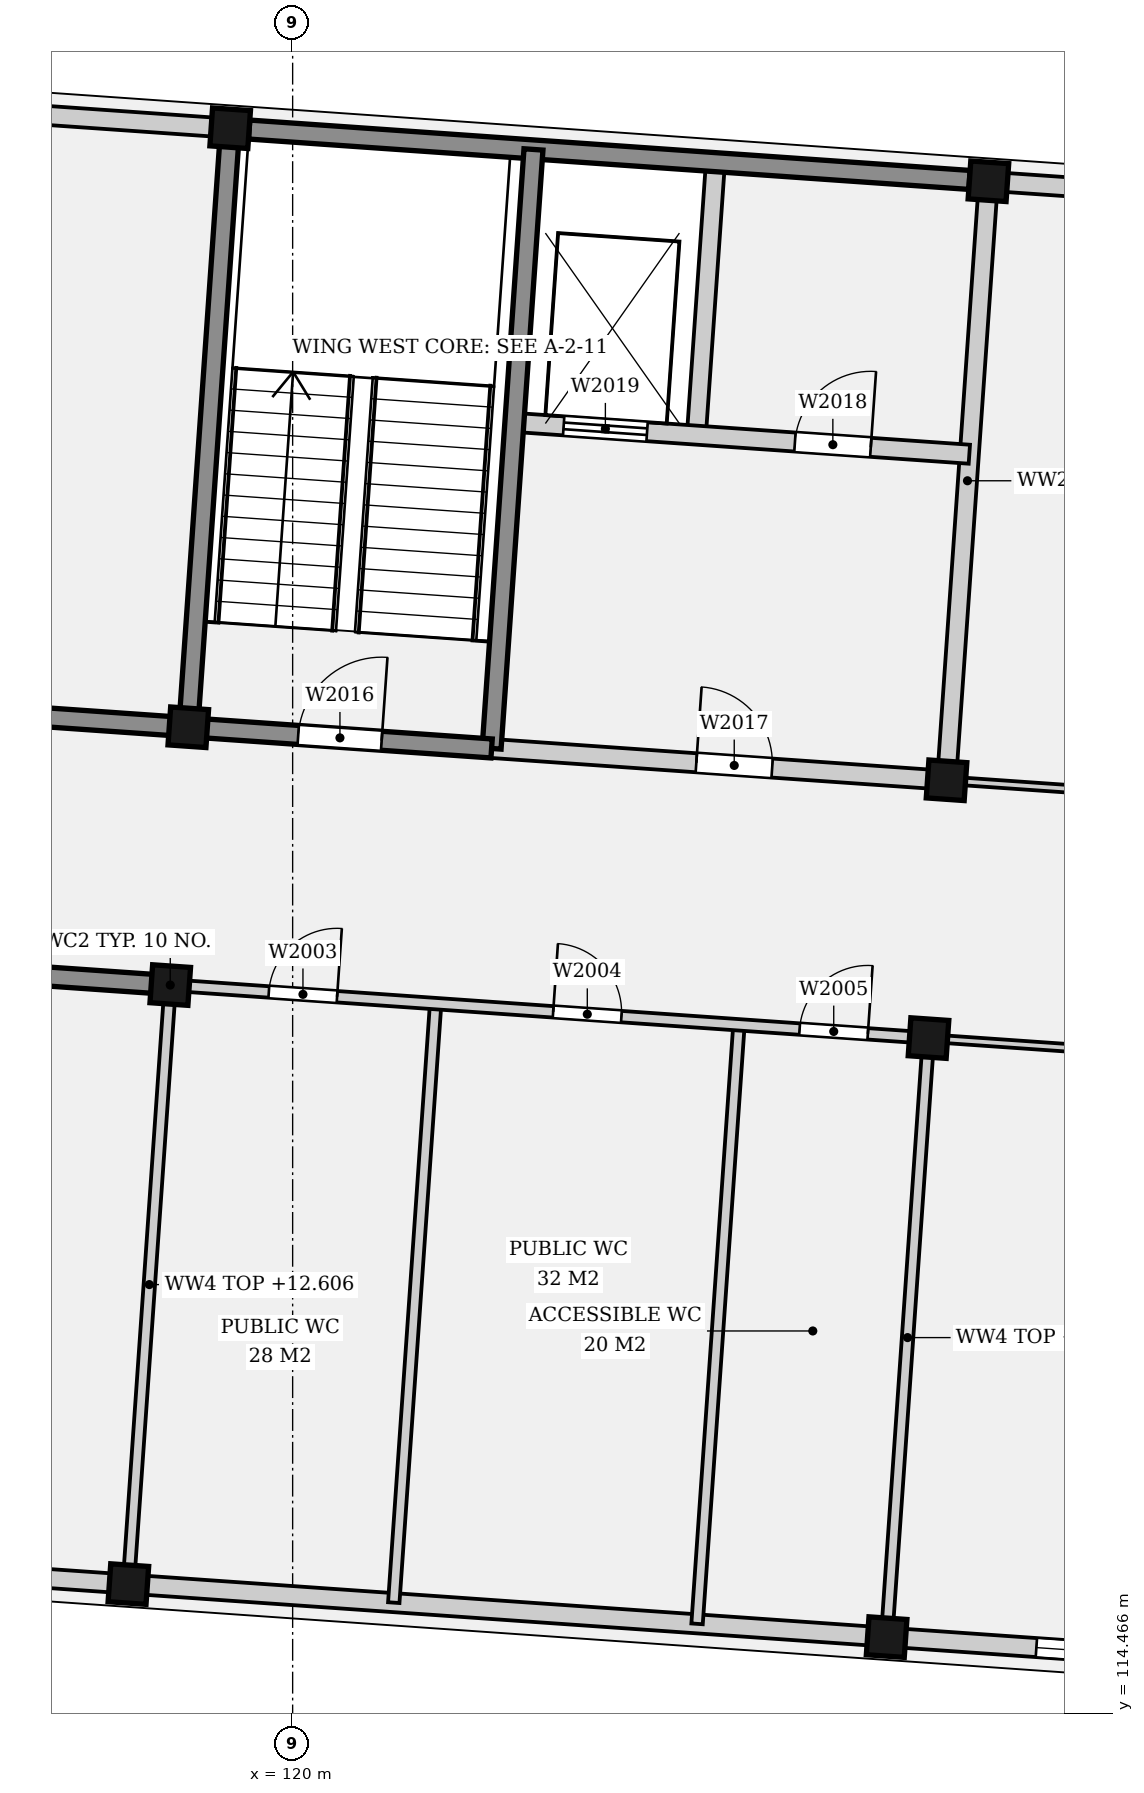
"""IFC4 building model, lengths in metres.
Left out: names, types, materials, properties, quantities, classifications, styles, units other than length and angle.
Written with IfcOpenShell. Run it as: python <this file> out.ifc"""

import sys

from ifc_helpers import new_model, si_unit, direction, frame, frame_2d, origin, origin_2d, place, context, subcontext, project, spatial, rectangle, extrude, element, fill, save


model = new_model("IFC4")
c1 = context("Model", 3, precision=1e-05, world=origin(), true_north=direction((0.0, 1.0)))
c2 = subcontext(c1, "Body", "Model", "MODEL_VIEW")
j1 = project(units=[si_unit("LENGTHUNIT", "METRE"), si_unit("PLANEANGLEUNIT", "RADIAN")], contexts=[c1])
p1 = place(None, origin())
s1 = spatial("IfcSite", under=j1, at=p1, CompositionType="ELEMENT")
p2 = place(p1, origin())
s2 = spatial("IfcBuilding", under=s1, at=p2, CompositionType="ELEMENT")
p3 = place(p2, frame((0.0, 0.0, 9.4)))
s3 = spatial("IfcBuildingStorey", under=s2, at=p3, CompositionType="ELEMENT", Elevation=9.4)
for number, where, z_axis, x_axis in (
    (1, (117.839, 116.167, 0.0), (0.0, 0.0, 1.0), (0.998, -0.07, 0.0)),
    (2, (118.39, 124.048, 0.0), (0.0, 0.0, 1.0), (0.998, -0.07, 0.0)),
    (3, (118.627, 127.44, 0.0), (0.0, 0.0, 1.0), (0.998, -0.07, 0.0)),
    (4, (119.178, 135.321, 0.0), (0.0, 0.0, 1.0), (0.998, -0.07, 0.0)),
    (5, (127.814, 115.47, 0.0), (0.0, 0.0, 1.0), (0.998, -0.07, 0.0)),
    (6, (128.365, 123.351, 0.0), (0.0, 0.0, 1.0), (0.998, -0.07, 0.0)),
    (7, (128.603, 126.742, 0.0), (0.0, 0.0, 1.0), (0.998, -0.07, 0.0)),
    (8, (129.154, 134.623, 0.0), (0.0, 0.0, 1.0), (0.998, -0.07, 0.0)),
):
    element("IfcColumn", number, at=place(p3, frame(where, z_axis=z_axis, x_axis=x_axis)), inside=s3, PredefinedType="COLUMN", context=c2, shape_type="SweptSolid", body=[
        extrude(rectangle(XDim=0.5, YDim=0.5, at=origin_2d()), origin(), (0.0, 0.0, 1.0), 4.4),
    ])
p4 = place(p3, frame((108.113, 116.848, 0.0), z_axis=(0.0, 0.0, 1.0), x_axis=(0.997564799463, -0.069745758817, 0.0)))
e9 = element("IfcWall", 9, at=p4, inside=s3, PredefinedType="SOLIDWALL", context=c2, shape_type="SweptSolid", body=[
    extrude(rectangle(XDim=9.5, YDim=0.25, at=frame_2d((4.75, 0.0))), origin(), (0.0, 0.0, 1.0), 3.206),
])
p5 = place(p3, frame((118.088, 116.15, 0.0), z_axis=(0.0, 0.0, 1.0), x_axis=(0.997562886035, -0.069773120941, 0.0)))
e10 = element("IfcWall", 10, at=p5, inside=s3, PredefinedType="SOLIDWALL", context=c2, shape_type="SweptSolid", body=[
    extrude(rectangle(XDim=9.5, YDim=0.25, at=frame_2d((4.75, 0.0))), origin(), (0.0, 0.0, 1.0), 3.57),
])
p6 = place(p3, frame((128.064, 115.452, 0.0), z_axis=(0.0, 0.0, 1.0), x_axis=(0.997564674448, -0.06974754686, 0.0)))
e11 = element("IfcWall", 11, at=p6, inside=s3, PredefinedType="SOLIDWALL", context=c2, shape_type="SweptSolid", body=[
    extrude(rectangle(XDim=9.5, YDim=0.25, at=frame_2d((4.75, 0.0))), origin(), (0.0, 0.0, 1.0), 3.57),
])
p7 = place(p6, frame((1.725, 0.0, 0.9)))
e12 = element("IfcOpeningElement", 12, at=p7, cuts=e11, PredefinedType="OPENING", context=c2, shape_type="SweptSolid", body=[
    extrude(rectangle(XDim=1.8, YDim=2.4, at=frame_2d((0.9, 1.2))), frame((0.0, 0.135, 0.0), z_axis=(0.0, -1.0, 0.0), x_axis=(1.0, 0.0, 0.0)), (0.0, 0.0, 1.0), 0.27),
])
p8 = place(p6, frame((5.975, 0.0, 0.9)))
e13 = element("IfcOpeningElement", 13, at=p8, cuts=e11, PredefinedType="OPENING", context=c2, shape_type="SweptSolid", body=[
    extrude(rectangle(XDim=1.8, YDim=2.4, at=frame_2d((0.9, 1.2))), frame((0.0, 0.135, 0.0), z_axis=(0.0, -1.0, 0.0), x_axis=(1.0, 0.0, 0.0)), (0.0, 0.0, 1.0), 0.27),
])
p9 = place(p3, frame((109.452, 136.001, 0.0), z_axis=(0.0, 0.0, 1.0), x_axis=(0.997562886035, -0.069773120941, 0.0)))
e14 = element("IfcWall", 14, at=p9, inside=s3, PredefinedType="SOLIDWALL", context=c2, shape_type="SweptSolid", body=[
    extrude(rectangle(XDim=9.5, YDim=0.25, at=frame_2d((4.75, 0.0))), origin(), (0.0, 0.0, 1.0), 3.206),
])
p10 = place(p3, frame((119.427, 135.303, 0.0), z_axis=(0.0, 0.0, 1.0), x_axis=(0.997564674448, -0.06974754686, 0.0)))
e15 = element("IfcWall", 15, at=p10, inside=s3, PredefinedType="SOLIDWALL", context=c2, shape_type="SweptSolid", body=[
    extrude(rectangle(XDim=9.5, YDim=0.25, at=frame_2d((4.75, 0.0))), origin(), (0.0, 0.0, 1.0), 3.57),
])
p11 = place(p3, frame((129.403, 134.606, 0.0), z_axis=(0.0, 0.0, 1.0), x_axis=(0.997564674448, -0.06974754686, 0.0)))
e16 = element("IfcWall", 16, at=p11, inside=s3, PredefinedType="SOLIDWALL", context=c2, shape_type="SweptSolid", body=[
    extrude(rectangle(XDim=9.5, YDim=0.25, at=frame_2d((4.75, 0.0))), origin(), (0.0, 0.0, 1.0), 3.57),
])
p12 = place(p11, frame((1.475, 0.0, 0.9)))
e17 = element("IfcOpeningElement", 17, at=p12, cuts=e16, PredefinedType="OPENING", context=c2, shape_type="SweptSolid", body=[
    extrude(rectangle(XDim=1.8, YDim=2.4, at=frame_2d((0.9, 1.2))), frame((0.0, 0.135, 0.0), z_axis=(0.0, -1.0, 0.0), x_axis=(1.0, 0.0, 0.0)), (0.0, 0.0, 1.0), 0.27),
])
p13 = place(p11, frame((5.85, 0.0, 0.9)))
e18 = element("IfcOpeningElement", 18, at=p13, cuts=e16, PredefinedType="OPENING", context=c2, shape_type="SweptSolid", body=[
    extrude(rectangle(XDim=1.8, YDim=2.4, at=frame_2d((0.9, 1.2))), frame((0.0, 0.135, 0.0), z_axis=(0.0, -1.0, 0.0), x_axis=(1.0, 0.0, 0.0)), (0.0, 0.0, 1.0), 0.27),
])
p14 = place(p3, frame((117.839, 116.167, 0.0), z_axis=(0.0, 0.0, 1.0), x_axis=(0.0697491702, 0.997564560947, 0.0)))
e19 = element("IfcWall", 19, at=p14, inside=s3, PredefinedType="PARTITIONING", context=c2, shape_type="SweptSolid", body=[
    extrude(rectangle(XDim=7.9, YDim=0.15, at=frame_2d((3.95, 0.0))), origin(), (0.0, 0.0, 1.0), 3.206),
])
p15 = place(p3, frame((118.627, 127.44, 0.0), z_axis=(0.0, 0.0, 1.0), x_axis=(0.0697491702, 0.997564560947, 0.0)))
e20 = element("IfcWall", 20, at=p15, inside=s3, PredefinedType="SOLIDWALL", context=c2, shape_type="SweptSolid", body=[
    extrude(rectangle(XDim=7.9, YDim=0.25, at=frame_2d((3.95, 0.0))), origin(), (0.0, 0.0, 1.0), 3.206),
])
p16 = place(p3, frame((121.33, 115.923, 0.0), z_axis=(0.0, 0.0, 1.0), x_axis=(0.0697491702, 0.997564560947, 0.0)))
e21 = element("IfcWall", 21, at=p16, inside=s3, PredefinedType="PARTITIONING", context=c2, shape_type="SweptSolid", body=[
    extrude(rectangle(XDim=7.9, YDim=0.15, at=frame_2d((3.95, 0.0))), origin(), (0.0, 0.0, 1.0), 3.57),
])
p17 = place(p3, frame((122.617, 127.161, 0.0), z_axis=(0.0, 0.0, 1.0), x_axis=(0.0697491702, 0.997564560947, 0.0)))
e22 = element("IfcWall", 22, at=p17, inside=s3, PredefinedType="SOLIDWALL", context=c2, shape_type="SweptSolid", body=[
    extrude(rectangle(XDim=7.9, YDim=0.25, at=frame_2d((3.95, 0.0))), origin(), (0.0, 0.0, 1.0), 3.57),
])
p18 = place(p3, frame((125.312, 131.283, 0.0), z_axis=(0.0, 0.0, 1.0), x_axis=(0.069719119461, 0.997566661623, 0.0)))
e23 = element("IfcWall", 23, at=p18, inside=s3, PredefinedType="SOLIDWALL", context=c2, shape_type="SweptSolid", body=[
    extrude(rectangle(XDim=3.6, YDim=0.25, at=frame_2d((1.8, 0.0))), origin(), (0.0, 0.0, 1.0), 3.57),
])
p19 = place(p3, frame((125.321, 115.644, 0.0), z_axis=(0.0, 0.0, 1.0), x_axis=(0.0697491702, 0.997564560947, 0.0)))
e24 = element("IfcWall", 24, at=p19, inside=s3, PredefinedType="PARTITIONING", context=c2, shape_type="SweptSolid", body=[
    extrude(rectangle(XDim=7.9, YDim=0.15, at=frame_2d((3.95, 0.0))), origin(), (0.0, 0.0, 1.0), 3.57),
])
p20 = place(p3, frame((127.814, 115.47, 0.0), z_axis=(0.0, 0.0, 1.0), x_axis=(0.069751320509, 0.997564410596, 0.0)))
e25 = element("IfcWall", 25, at=p20, inside=s3, PredefinedType="PARTITIONING", context=c2, shape_type="SweptSolid", body=[
    extrude(rectangle(XDim=7.9, YDim=0.15, at=frame_2d((3.95, 0.0))), origin(), (0.0, 0.0, 1.0), 3.57),
])
p21 = place(p3, frame((128.603, 126.742, 0.0), z_axis=(0.0, 0.0, 1.0), x_axis=(0.0697491702, 0.997564560947, 0.0)))
e26 = element("IfcWall", 26, at=p21, inside=s3, PredefinedType="SOLIDWALL", context=c2, shape_type="SweptSolid", body=[
    extrude(rectangle(XDim=7.9, YDim=0.25, at=frame_2d((3.95, 0.0))), origin(), (0.0, 0.0, 1.0), 3.57),
])
p22 = place(p3, frame((102.13, 125.185, 0.0), z_axis=(0.0, 0.0, 1.0), x_axis=(0.997564327004, -0.069752516003, 0.0)))
e27 = element("IfcWall", 27, at=p22, inside=s3, PredefinedType="PARTITIONING", context=c2, shape_type="SweptSolid", body=[
    extrude(rectangle(XDim=16.3, YDim=0.25, at=frame_2d((8.15, 0.0))), origin(), (0.0, 0.0, 1.0), 3.442),
])
p23 = place(p22, frame((6.9, 0.0, 0.0)))
e28 = element("IfcOpeningElement", 28, at=p23, cuts=e27, PredefinedType="OPENING", context=c2, shape_type="SweptSolid", body=[
    extrude(rectangle(XDim=1.8, YDim=2.1, at=frame_2d((0.9, 1.05))), frame((0.0, 0.135, 0.0), z_axis=(0.0, -1.0, 0.0), x_axis=(1.0, 0.0, 0.0)), (0.0, 0.0, 1.0), 0.27),
])
p24 = place(p3, frame((118.39, 124.048, 0.0), z_axis=(0.0, 0.0, 1.0), x_axis=(0.997562707158, -0.069775678342, 0.0)))
e29 = element("IfcWall", 29, at=p24, inside=s3, PredefinedType="PARTITIONING", context=c2, shape_type="SweptSolid", body=[
    extrude(rectangle(XDim=10.0, YDim=0.15, at=frame_2d((5.0, 0.0))), origin(), (0.0, 0.0, 1.0), 3.57),
])
p25 = place(p24, frame((1.3, 0.0, 0.0)))
e30 = element("IfcOpeningElement", 30, at=p25, cuts=e29, PredefinedType="OPENING", context=c2, shape_type="SweptSolid", body=[
    extrude(rectangle(XDim=0.9, YDim=2.1, at=frame_2d((0.45, 1.05))), frame((0.0, 0.085, 0.0), z_axis=(0.0, -1.0, 0.0), x_axis=(1.0, 0.0, 0.0)), (0.0, 0.0, 1.0), 0.17),
])
p26 = place(p24, frame((5.05, 0.0, 0.0)))
e31 = element("IfcOpeningElement", 31, at=p26, cuts=e29, PredefinedType="OPENING", context=c2, shape_type="SweptSolid", body=[
    extrude(rectangle(XDim=0.9, YDim=2.1, at=frame_2d((0.45, 1.05))), frame((0.0, 0.085, 0.0), z_axis=(0.0, -1.0, 0.0), x_axis=(1.0, 0.0, 0.0)), (0.0, 0.0, 1.0), 0.17),
])
p27 = place(p24, frame((8.3, 0.0, 0.0)))
e32 = element("IfcOpeningElement", 32, at=p27, cuts=e29, PredefinedType="OPENING", context=c2, shape_type="SweptSolid", body=[
    extrude(rectangle(XDim=0.9, YDim=2.1, at=frame_2d((0.45, 1.05))), frame((0.0, 0.085, 0.0), z_axis=(0.0, -1.0, 0.0), x_axis=(1.0, 0.0, 0.0)), (0.0, 0.0, 1.0), 0.17),
])
p28 = place(p3, frame((128.365, 123.351, 0.0), z_axis=(0.0, 0.0, 1.0), x_axis=(0.997564465617, -0.069750533603, 0.0)))
e33 = element("IfcWall", 33, at=p28, inside=s3, PredefinedType="PARTITIONING", context=c2, shape_type="SweptSolid", body=[
    extrude(rectangle(XDim=20.0, YDim=0.1, at=frame_2d((10.0, 0.0))), origin(), (0.0, 0.0, 1.0), 3.57),
])
p29 = place(p28, frame((4.6, 0.0, 0.0)))
e34 = element("IfcOpeningElement", 34, at=p29, cuts=e33, PredefinedType="OPENING", context=c2, shape_type="SweptSolid", body=[
    extrude(rectangle(XDim=1.8, YDim=2.1, at=frame_2d((0.9, 1.05))), frame((0.0, 0.06, 0.0), z_axis=(0.0, -1.0, 0.0), x_axis=(1.0, 0.0, 0.0)), (0.0, 0.0, 1.0), 0.12),
])
p30 = place(p3, frame((102.367, 128.577, 0.0), z_axis=(0.0, 0.0, 1.0), x_axis=(0.997564399877, -0.069751473811, 0.0)))
e35 = element("IfcWall", 35, at=p30, inside=s3, PredefinedType="PARTITIONING", context=c2, shape_type="SweptSolid", body=[
    extrude(rectangle(XDim=16.3, YDim=0.25, at=frame_2d((8.15, 0.0))), origin(), (0.0, 0.0, 1.0), 3.442),
])
p31 = place(p30, frame((6.9, 0.0, 0.0)))
e36 = element("IfcOpeningElement", 36, at=p31, cuts=e35, PredefinedType="OPENING", context=c2, shape_type="SweptSolid", body=[
    extrude(rectangle(XDim=1.8, YDim=2.1, at=frame_2d((0.9, 1.05))), frame((0.0, 0.135, 0.0), z_axis=(0.0, -1.0, 0.0), x_axis=(1.0, 0.0, 0.0)), (0.0, 0.0, 1.0), 0.27),
])
p32 = place(p3, frame((118.627, 127.44, 0.0), z_axis=(0.0, 0.0, 1.0), x_axis=(0.997563556766, -0.069763530677, 0.0)))
e37 = element("IfcWall", 37, at=p32, inside=s3, PredefinedType="SOLIDWALL", context=c2, shape_type="SweptSolid", body=[
    extrude(rectangle(XDim=4.0, YDim=0.25, at=frame_2d((2.0, 0.0))), origin(), (0.0, 0.0, 1.0), 3.57),
])
p33 = place(p32, frame((1.45, 0.0, 0.0)))
e38 = element("IfcOpeningElement", 38, at=p33, cuts=e37, PredefinedType="OPENING", context=c2, shape_type="SweptSolid", body=[
    extrude(rectangle(XDim=1.1, YDim=2.1, at=frame_2d((0.55, 1.05))), frame((0.0, 0.135, 0.0), z_axis=(0.0, -1.0, 0.0), x_axis=(1.0, 0.0, 0.0)), (0.0, 0.0, 1.0), 0.27),
])
p34 = place(p3, frame((122.617, 127.161, 0.0), z_axis=(0.0, 0.0, 1.0), x_axis=(0.997564972454, -0.069743284499, 0.0)))
e39 = element("IfcWall", 39, at=p34, inside=s3, PredefinedType="SOLIDWALL", context=c2, shape_type="SweptSolid", body=[
    extrude(rectangle(XDim=6.0, YDim=0.25, at=frame_2d((3.0, 0.0))), origin(), (0.0, 0.0, 1.0), 3.57),
])
p35 = place(p34, frame((2.7, 0.0, 0.0)))
e40 = element("IfcOpeningElement", 40, at=p35, cuts=e39, PredefinedType="OPENING", context=c2, shape_type="SweptSolid", body=[
    extrude(rectangle(XDim=1.0, YDim=2.1, at=frame_2d((0.5, 1.05))), frame((0.0, 0.135, 0.0), z_axis=(0.0, -1.0, 0.0), x_axis=(1.0, 0.0, 0.0)), (0.0, 0.0, 1.0), 0.27),
])
p36 = place(p3, frame((128.603, 126.742, 0.0), z_axis=(0.0, 0.0, 1.0), x_axis=(0.997566104712, -0.069727087495, 0.0)))
e41 = element("IfcWall", 41, at=p36, inside=s3, PredefinedType="PARTITIONING", context=c2, shape_type="SweptSolid", body=[
    extrude(rectangle(XDim=5.0, YDim=0.1, at=frame_2d((2.5, 0.0))), origin(), (0.0, 0.0, 1.0), 3.57),
])
p37 = place(p36, frame((1.6, 0.0, 0.0)))
e42 = element("IfcOpeningElement", 42, at=p37, cuts=e41, PredefinedType="OPENING", context=c2, shape_type="SweptSolid", body=[
    extrude(rectangle(XDim=1.8, YDim=2.1, at=frame_2d((0.9, 1.05))), frame((0.0, 0.06, 0.0), z_axis=(0.0, -1.0, 0.0), x_axis=(1.0, 0.0, 0.0)), (0.0, 0.0, 1.0), 0.12),
])
p38 = place(p3, frame((122.917, 131.45, 0.0), z_axis=(0.0, 0.0, 1.0), x_axis=(0.997564972454, -0.069743284499, 0.0)))
e43 = element("IfcWall", 43, at=p38, inside=s3, PredefinedType="SOLIDWALL", context=c2, shape_type="SweptSolid", body=[
    extrude(rectangle(XDim=6.0, YDim=0.25, at=frame_2d((3.0, 0.0))), origin(), (0.0, 0.0, 1.0), 3.57),
])
p39 = place(p38, frame((3.7, 0.0, 0.0)))
e44 = element("IfcOpeningElement", 44, at=p39, cuts=e43, PredefinedType="OPENING", context=c2, shape_type="SweptSolid", body=[
    extrude(rectangle(XDim=1.0, YDim=2.1, at=frame_2d((0.5, 1.05))), frame((0.0, 0.135, 0.0), z_axis=(0.0, -1.0, 0.0), x_axis=(1.0, 0.0, 0.0)), (0.0, 0.0, 1.0), 0.27),
])
p40 = place(p38, frame((0.65, 0.0, 0.0)))
e45 = element("IfcOpeningElement", 45, at=p40, cuts=e43, PredefinedType="OPENING", context=c2, shape_type="SweptSolid", body=[
    extrude(rectangle(XDim=1.1, YDim=2.1, at=frame_2d((0.55, 1.05))), frame((0.0, 0.135, 0.0), z_axis=(0.0, -1.0, 0.0), x_axis=(1.0, 0.0, 0.0)), (0.0, 0.0, 1.0), 0.27),
])
p41 = place(p7, origin())
e46 = element("IfcWindow", 46, at=p41, inside=s3, PartitioningType="SINGLE_PANEL", PredefinedType="WINDOW", context=c2, shape_type="SweptSolid", body=[
    extrude(rectangle(XDim=1.8, YDim=2.4, at=frame_2d((0.9, 1.2))), frame((0.0, 0.03, 0.0), z_axis=(0.0, -1.0, 0.0), x_axis=(1.0, 0.0, 0.0)), (0.0, 0.0, 1.0), 0.06),
])
fill(e12, e46)
p42 = place(p25, origin())
e47 = element("IfcDoor", 47, at=p42, inside=s3, OperationType="SINGLE_SWING_RIGHT", PredefinedType="DOOR", context=c2, shape_type="SweptSolid", body=[
    extrude(rectangle(XDim=0.9, YDim=2.1, at=frame_2d((0.45, 1.05))), frame((0.0, 0.025, 0.0), z_axis=(0.0, -1.0, 0.0), x_axis=(1.0, 0.0, 0.0)), (0.0, 0.0, 1.0), 0.05),
])
fill(e30, e47)
p43 = place(p26, origin())
e48 = element("IfcDoor", 48, at=p43, inside=s3, OperationType="SINGLE_SWING_LEFT", PredefinedType="DOOR", context=c2, shape_type="SweptSolid", body=[
    extrude(rectangle(XDim=0.9, YDim=2.1, at=frame_2d((0.45, 1.05))), frame((0.0, 0.025, 0.0), z_axis=(0.0, -1.0, 0.0), x_axis=(1.0, 0.0, 0.0)), (0.0, 0.0, 1.0), 0.05),
])
fill(e31, e48)
p44 = place(p27, origin())
e49 = element("IfcDoor", 49, at=p44, inside=s3, OperationType="SINGLE_SWING_RIGHT", PredefinedType="DOOR", context=c2, shape_type="SweptSolid", body=[
    extrude(rectangle(XDim=0.9, YDim=2.1, at=frame_2d((0.45, 1.05))), frame((0.0, 0.025, 0.0), z_axis=(0.0, -1.0, 0.0), x_axis=(1.0, 0.0, 0.0)), (0.0, 0.0, 1.0), 0.05),
])
fill(e32, e49)
p45 = place(p33, origin())
e50 = element("IfcDoor", 50, at=p45, inside=s3, OperationType="SINGLE_SWING_RIGHT", PredefinedType="DOOR", context=c2, shape_type="SweptSolid", body=[
    extrude(rectangle(XDim=1.1, YDim=2.1, at=frame_2d((0.55, 1.05))), frame((0.0, 0.025, 0.0), z_axis=(0.0, -1.0, 0.0), x_axis=(1.0, 0.0, 0.0)), (0.0, 0.0, 1.0), 0.05),
])
fill(e38, e50)
p46 = place(p35, origin())
e51 = element("IfcDoor", 51, at=p46, inside=s3, OperationType="SINGLE_SWING_LEFT", PredefinedType="DOOR", context=c2, shape_type="SweptSolid", body=[
    extrude(rectangle(XDim=1.0, YDim=2.1, at=frame_2d((0.5, 1.05))), frame((0.0, 0.025, 0.0), z_axis=(0.0, -1.0, 0.0), x_axis=(1.0, 0.0, 0.0)), (0.0, 0.0, 1.0), 0.05),
])
fill(e40, e51)
p47 = place(p39, origin())
e52 = element("IfcDoor", 52, at=p47, inside=s3, OperationType="SINGLE_SWING_RIGHT", PredefinedType="DOOR", context=c2, shape_type="SweptSolid", body=[
    extrude(rectangle(XDim=1.0, YDim=2.1, at=frame_2d((0.5, 1.05))), frame((0.0, 0.025, 0.0), z_axis=(0.0, -1.0, 0.0), x_axis=(1.0, 0.0, 0.0)), (0.0, 0.0, 1.0), 0.05),
])
fill(e44, e52)
p48 = place(p40, origin())
e53 = element("IfcDoor", 53, at=p48, inside=s3, OperationType="SLIDING_TO_LEFT", PredefinedType="DOOR", context=c2, shape_type="SweptSolid", body=[
    extrude(rectangle(XDim=1.1, YDim=2.1, at=frame_2d((0.55, 1.05))), frame((0.0, 0.025, 0.0), z_axis=(0.0, -1.0, 0.0), x_axis=(1.0, 0.0, 0.0)), (0.0, 0.0, 1.0), 0.05),
])
fill(e45, e53)
save(model, sys.argv[1])
